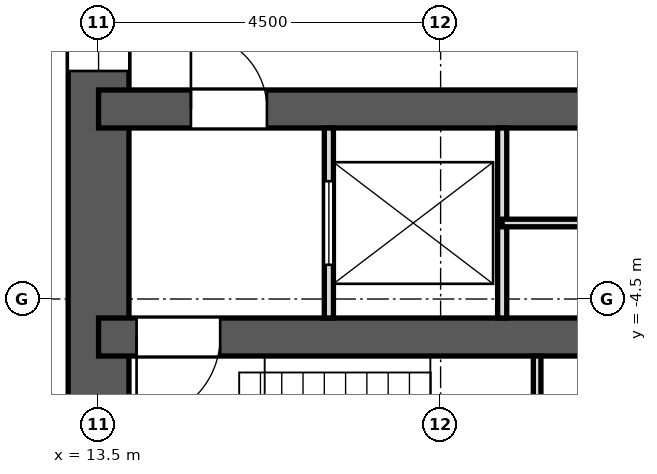
"""IFC4 building model, lengths in metres.
Left out: names, types, materials, properties, quantities, classifications, styles, units other than length and angle.
Written with IfcOpenShell. Run it as: python <this file> out.ifc"""

import sys

from ifc_helpers import new_model, si_unit, direction, frame, frame_2d, origin, place, context, subcontext, project, spatial, rectangle, extrude, element, fill, save


model = new_model("IFC4")
c1 = context("Model", 3, precision=1e-05, world=origin(), true_north=direction((0.0, 1.0)))
c2 = subcontext(c1, "Body", "Model", "MODEL_VIEW")
j1 = project(units=[si_unit("LENGTHUNIT", "METRE"), si_unit("PLANEANGLEUNIT", "RADIAN")], contexts=[c1])
p1 = place(None, origin())
s1 = spatial("IfcSite", under=j1, at=p1, CompositionType="ELEMENT")
p2 = place(p1, origin())
s2 = spatial("IfcBuilding", under=s1, at=p2, CompositionType="ELEMENT")
p3 = place(p2, frame((0.0, 0.0, 131.5)))
s3 = spatial("IfcBuildingStorey", under=s2, at=p3, CompositionType="ELEMENT", Elevation=131.5)
p4 = place(p3, frame((13.5, -9.0, 0.0), z_axis=(0.0, 0.0, 1.0), x_axis=(0.0, 1.0, 0.0)))
e1 = element("IfcWall", 1, at=p4, inside=s3, PredefinedType="SHEAR", context=c2, shape_type="SweptSolid", body=[
    extrude(rectangle(XDim=18.0, YDim=0.8, at=frame_2d((9.0, 0.0))), origin(), (0.0, 0.0, 1.0), 3.3),
])
p5 = place(p4, frame((15.4, 0.0, 0.0)))
e2 = element("IfcOpeningElement", 2, at=p5, cuts=e1, PredefinedType="OPENING", context=c2, shape_type="SweptSolid", body=[
    extrude(rectangle(XDim=1.2, YDim=2.1, at=frame_2d((0.6, 1.05))), frame((0.0, 0.412, 0.0), z_axis=(0.0, -1.0, 0.0), x_axis=(1.0, 0.0, 0.0)), (0.0, 0.0, 1.0), 0.824),
])
p6 = place(p4, frame((1.4, 0.0, 0.0)))
e3 = element("IfcOpeningElement", 3, at=p6, cuts=e1, PredefinedType="OPENING", context=c2, shape_type="SweptSolid", body=[
    extrude(rectangle(XDim=1.2, YDim=2.1, at=frame_2d((0.6, 1.05))), frame((0.0, 0.412, 0.0), z_axis=(0.0, -1.0, 0.0), x_axis=(1.0, 0.0, 0.0)), (0.0, 0.0, 1.0), 0.824),
])
p7 = place(p4, frame((7.5, 0.0, 0.0)))
e4 = element("IfcOpeningElement", 4, at=p7, cuts=e1, PredefinedType="OPENING", context=c2, shape_type="SweptSolid", body=[
    extrude(rectangle(XDim=3.0, YDim=2.4, at=frame_2d((1.5, 1.2))), frame((0.0, 0.412, 0.0), z_axis=(0.0, -1.0, 0.0), x_axis=(1.0, 0.0, 0.0)), (0.0, 0.0, 1.0), 0.824),
])
p8 = place(p3, frame((13.5, -5.0, 0.0), z_axis=(0.0, 0.0, 1.0), x_axis=(1.0, 0.0, 0.0)))
e5 = element("IfcWall", 5, at=p8, inside=s3, PredefinedType="SHEAR", context=c2, shape_type="SweptSolid", body=[
    extrude(rectangle(XDim=10.4, YDim=0.5, at=frame_2d((5.2, 0.0))), origin(), (0.0, 0.0, 1.0), 3.3),
])
p9 = place(p8, frame((6.639, 0.0, 0.0)))
e6 = element("IfcOpeningElement", 6, at=p9, cuts=e5, PredefinedType="OPENING", context=c2, shape_type="SweptSolid", body=[
    extrude(rectangle(XDim=0.9, YDim=2.1, at=frame_2d((0.45, 1.05))), frame((0.0, 0.262, 0.0), z_axis=(0.0, -1.0, 0.0), x_axis=(1.0, 0.0, 0.0)), (0.0, 0.0, 1.0), 0.524),
])
p10 = place(p8, frame((8.756, 0.0, 0.0)))
e7 = element("IfcOpeningElement", 7, at=p10, cuts=e5, PredefinedType="OPENING", context=c2, shape_type="SweptSolid", body=[
    extrude(rectangle(XDim=0.9, YDim=2.1, at=frame_2d((0.45, 1.05))), frame((0.0, 0.262, 0.0), z_axis=(0.0, -1.0, 0.0), x_axis=(1.0, 0.0, 0.0)), (0.0, 0.0, 1.0), 0.524),
])
p11 = place(p8, frame((0.5, 0.0, 0.0)))
e8 = element("IfcOpeningElement", 8, at=p11, cuts=e5, PredefinedType="OPENING", context=c2, shape_type="SweptSolid", body=[
    extrude(rectangle(XDim=1.1, YDim=2.1, at=frame_2d((0.55, 1.05))), frame((0.0, 0.262, 0.0), z_axis=(0.0, -1.0, 0.0), x_axis=(1.0, 0.0, 0.0)), (0.0, 0.0, 1.0), 0.524),
])
p12 = place(p3, frame((13.5, -2.0, 0.0), z_axis=(0.0, 0.0, 1.0), x_axis=(1.0, 0.0, 0.0)))
e9 = element("IfcWall", 9, at=p12, inside=s3, PredefinedType="SHEAR", context=c2, shape_type="SweptSolid", body=[
    extrude(rectangle(XDim=10.4, YDim=0.5, at=frame_2d((5.2, 0.0))), origin(), (0.0, 0.0, 1.0), 3.3),
])
p13 = place(p12, frame((1.215, 0.0, 0.0)))
e10 = element("IfcOpeningElement", 10, at=p13, cuts=e9, PredefinedType="OPENING", context=c2, shape_type="SweptSolid", body=[
    extrude(rectangle(XDim=1.0, YDim=2.1, at=frame_2d((0.5, 1.05))), frame((0.0, 0.262, 0.0), z_axis=(0.0, -1.0, 0.0), x_axis=(1.0, 0.0, 0.0)), (0.0, 0.0, 1.0), 0.524),
])
p14 = place(p12, frame((6.384, 0.0, 0.0)))
e11 = element("IfcOpeningElement", 11, at=p14, cuts=e9, PredefinedType="OPENING", context=c2, shape_type="SweptSolid", body=[
    extrude(rectangle(XDim=0.9, YDim=2.1, at=frame_2d((0.45, 1.05))), frame((0.0, 0.262, 0.0), z_axis=(0.0, -1.0, 0.0), x_axis=(1.0, 0.0, 0.0)), (0.0, 0.0, 1.0), 0.524),
])
p15 = place(p12, frame((8.729, 0.0, 0.0)))
e12 = element("IfcOpeningElement", 12, at=p15, cuts=e9, PredefinedType="OPENING", context=c2, shape_type="SweptSolid", body=[
    extrude(rectangle(XDim=0.9, YDim=2.1, at=frame_2d((0.45, 1.05))), frame((0.0, 0.262, 0.0), z_axis=(0.0, -1.0, 0.0), x_axis=(1.0, 0.0, 0.0)), (0.0, 0.0, 1.0), 0.524),
])
p16 = place(p3, frame((16.53, -4.75, 0.0), z_axis=(0.0, 0.0, 1.0), x_axis=(0.0, 1.0, 0.0)))
e13 = element("IfcWall", 13, at=p16, inside=s3, PredefinedType="PARTITIONING", context=c2, shape_type="SweptSolid", body=[
    extrude(rectangle(XDim=2.5, YDim=0.12, at=frame_2d((1.25, 0.0))), origin(), (0.0, 0.0, 1.0), 2.8),
])
p17 = place(p16, frame((0.7, 0.0, 0.0)))
e14 = element("IfcOpeningElement", 14, at=p17, cuts=e13, PredefinedType="OPENING", context=c2, shape_type="SweptSolid", body=[
    extrude(rectangle(XDim=1.1, YDim=2.1, at=frame_2d((0.55, 1.05))), frame((0.0, 0.072, 0.0), z_axis=(0.0, -1.0, 0.0), x_axis=(1.0, 0.0, 0.0)), (0.0, 0.0, 1.0), 0.144),
])
p18 = place(p3, frame((18.81, -4.75, 0.0), z_axis=(0.0, 0.0, 1.0), x_axis=(0.0, 1.0, 0.0)))
e15 = element("IfcWall", 15, at=p18, inside=s3, PredefinedType="PARTITIONING", context=c2, shape_type="SweptSolid", body=[
    extrude(rectangle(XDim=2.5, YDim=0.12, at=frame_2d((1.25, 0.0))), origin(), (0.0, 0.0, 1.0), 2.8),
])
p19 = place(p3, frame((18.81, -3.5, 0.0), z_axis=(0.0, 0.0, 1.0), x_axis=(1.0, 0.0, 0.0)))
e16 = element("IfcWall", 16, at=p19, inside=s3, PredefinedType="PARTITIONING", context=c2, shape_type="SweptSolid", body=[
    extrude(rectangle(XDim=3.048, YDim=0.1, at=frame_2d((1.524, 0.0))), origin(), (0.0, 0.0, 1.0), 2.8),
])
p20 = place(p19, frame((1.074, 0.0, 0.0)))
e17 = element("IfcOpeningElement", 17, at=p20, cuts=e16, PredefinedType="OPENING", context=c2, shape_type="SweptSolid", body=[
    extrude(rectangle(XDim=0.9, YDim=2.1, at=frame_2d((0.45, 1.05))), frame((0.0, 0.062, 0.0), z_axis=(0.0, -1.0, 0.0), x_axis=(1.0, 0.0, 0.0)), (0.0, 0.0, 1.0), 0.124),
])
p21 = place(p3, frame((19.27, -8.6, 0.0), z_axis=(0.0, 0.0, 1.0), x_axis=(0.0, 1.0, 0.0)))
e18 = element("IfcWall", 18, at=p21, inside=s3, PredefinedType="PARTITIONING", context=c2, shape_type="SweptSolid", body=[
    extrude(rectangle(XDim=3.35, YDim=0.1, at=frame_2d((1.675, 0.0))), origin(), (0.0, 0.0, 1.0), 2.8),
])
p22 = place(p17, origin())
e19 = element("IfcDoor", 19, at=p22, inside=s3, OperationType="DOUBLE_DOOR_SLIDING", PredefinedType="DOOR", context=c2, shape_type="SweptSolid", body=[
    extrude(rectangle(XDim=1.1, YDim=2.1, at=frame_2d((0.55, 1.05))), frame((0.0, 0.025, 0.0), z_axis=(0.0, -1.0, 0.0), x_axis=(1.0, 0.0, 0.0)), (0.0, 0.0, 1.0), 0.05),
])
fill(e14, e19)
p23 = place(p13, origin())
e20 = element("IfcDoor", 20, at=p23, inside=s3, OperationType="SINGLE_SWING_LEFT", PredefinedType="DOOR", context=c2, shape_type="SweptSolid", body=[
    extrude(rectangle(XDim=1.0, YDim=2.1, at=frame_2d((0.5, 1.05))), frame((0.0, 0.025, 0.0), z_axis=(0.0, -1.0, 0.0), x_axis=(1.0, 0.0, 0.0)), (0.0, 0.0, 1.0), 0.05),
])
fill(e10, e20)
p24 = place(p11, frame((1.1, 0.0, 0.0), z_axis=(0.0, 0.0, 1.0), x_axis=(-1.0, 0.0, 0.0)))
e21 = element("IfcDoor", 21, at=p24, inside=s3, OperationType="SINGLE_SWING_RIGHT", PredefinedType="DOOR", context=c2, shape_type="SweptSolid", body=[
    extrude(rectangle(XDim=1.1, YDim=2.1, at=frame_2d((0.55, 1.05))), frame((0.0, 0.025, 0.0), z_axis=(0.0, -1.0, 0.0), x_axis=(1.0, 0.0, 0.0)), (0.0, 0.0, 1.0), 0.05),
])
fill(e8, e21)
p25 = place(p7, origin())
e22 = element("IfcDoor", 22, at=p25, inside=s3, OperationType="DOUBLE_DOOR_SLIDING", PredefinedType="DOOR", context=c2, shape_type="SweptSolid", body=[
    extrude(rectangle(XDim=3.0, YDim=2.4, at=frame_2d((1.5, 1.2))), frame((0.0, 0.025, 0.0), z_axis=(0.0, -1.0, 0.0), x_axis=(1.0, 0.0, 0.0)), (0.0, 0.0, 1.0), 0.05),
])
fill(e4, e22)
save(model, sys.argv[1])
